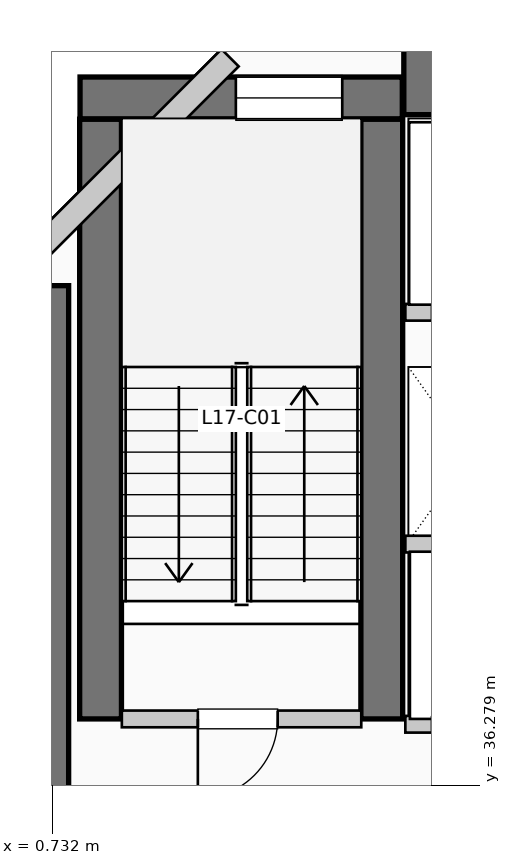
"""IFC4 building model, lengths in metres.
Left out: names, types, materials, properties, quantities, classifications, styles, units other than length and angle.
Written with IfcOpenShell. Run it as: python <this file> out.ifc"""

import sys

from ifc_helpers import new_model, si_unit, direction, frame, frame_2d, origin, place, context, subcontext, project, spatial, rectangle, extrude, element, fill, save


model = new_model("IFC4")
c1 = context("Model", 3, precision=1e-05, world=origin(), true_north=direction((0.0, 1.0)))
c2 = subcontext(c1, "Body", "Model", "MODEL_VIEW")
j1 = project(units=[si_unit("LENGTHUNIT", "METRE"), si_unit("PLANEANGLEUNIT", "RADIAN")], contexts=[c1])
p1 = place(None, origin())
s1 = spatial("IfcSite", under=j1, at=p1, CompositionType="ELEMENT")
p2 = place(p1, origin())
s2 = spatial("IfcBuilding", under=s1, at=p2, CompositionType="ELEMENT")
p3 = place(p2, frame((0.0, 0.0, 73.92)))
s3 = spatial("IfcBuildingStorey", under=s2, at=p3, CompositionType="ELEMENT", Elevation=73.92)
p4 = place(p3, frame((5.36, 45.55, 0.0), z_axis=(0.0, 0.0, 1.0), x_axis=(1.0, 0.0, 0.0)))
e1 = element("IfcWall", 1, at=p4, inside=s3, PredefinedType="SHEAR", context=c2, shape_type="SweptSolid", body=[
    extrude(rectangle(XDim=13.98, YDim=0.9, at=frame_2d((6.99, 0.0))), origin(), (0.0, 0.0, 1.0), 3.96),
])
p5 = place(p3, frame((0.5, 34.95, 0.0), z_axis=(0.0, 0.0, 1.0), x_axis=(0.0, 1.0, 0.0)))
e2 = element("IfcWall", 2, at=p5, inside=s3, PredefinedType="SHEAR", context=c2, shape_type="SweptSolid", body=[
    extrude(rectangle(XDim=7.9, YDim=0.9, at=frame_2d((3.95, 0.0))), origin(), (0.0, 0.0, 1.0), 3.96),
])
for number, where, z_axis, x_axis in (
    (3, (1.37, 37.15, 0.0), (0.0, 0.0, 1.0), (0.0, 1.0, 0.0)),
    (4, (5.07, 37.15, 0.0), (0.0, 0.0, 1.0), (0.0, 1.0, 0.0)),
):
    element("IfcWall", number, at=place(p3, frame(where, z_axis=z_axis, x_axis=x_axis)), inside=s3, PredefinedType="SHEAR", context=c2, shape_type="SweptSolid", body=[
        extrude(rectangle(XDim=7.89, YDim=0.55, at=frame_2d((3.945, 0.0))), origin(), (0.0, 0.0, 1.0), 3.96),
    ])
p6 = place(p3, frame((1.1, 45.32, 0.0), z_axis=(0.0, 0.0, 1.0), x_axis=(1.0, 0.0, 0.0)))
e5 = element("IfcWall", 5, at=p6, inside=s3, PredefinedType="SHEAR", context=c2, shape_type="SweptSolid", body=[
    extrude(rectangle(XDim=4.24, YDim=0.55, at=frame_2d((2.12, 0.0))), origin(), (0.0, 0.0, 1.0), 3.96),
])
p7 = place(p6, frame((2.05, 0.0, 1.05)))
e6 = element("IfcOpeningElement", 6, at=p7, cuts=e5, PredefinedType="OPENING", context=c2, shape_type="SweptSolid", body=[
    extrude(rectangle(XDim=1.4, YDim=1.8, at=frame_2d((0.7, 0.9))), frame((0.0, 0.285, 0.0), z_axis=(0.0, -1.0, 0.0), x_axis=(1.0, 0.0, 0.0)), (0.0, 0.0, 1.0), 0.57),
])
p8 = place(p3, frame((3.074, 45.848, 0.0), z_axis=(0.0, 0.0, 1.0), x_axis=(-0.707106781187, -0.707106781187, 0.0)))
e7 = element("IfcWall", 7, at=p8, inside=s3, PredefinedType="SOLIDWALL", context=c2, shape_type="SweptSolid", body=[
    extrude(rectangle(XDim=4.133, YDim=0.32, at=frame_2d((2.066, 0.0))), origin(), (0.0, 0.0, 1.0), 3.71),
])
p9 = place(p3, frame((1.65, 37.15, 0.0), z_axis=(0.0, 0.0, 1.0), x_axis=(1.0, 0.0, 0.0)))
e8 = element("IfcWall", 8, at=p9, inside=s3, PredefinedType="PARTITIONING", context=c2, shape_type="SweptSolid", body=[
    extrude(rectangle(XDim=3.15, YDim=0.22, at=frame_2d((1.575, 0.0))), origin(), (0.0, 0.0, 1.0), 3.71),
])
p10 = place(p9, frame((2.05, 0.0, 0.0), z_axis=(0.0, 0.0, 1.0), x_axis=(-1.0, 0.0, 0.0)))
e9 = element("IfcOpeningElement", 9, at=p10, cuts=e8, PredefinedType="OPENING", context=c2, shape_type="SweptSolid", body=[
    extrude(rectangle(XDim=1.05, YDim=2.15, at=frame_2d((0.525, 1.075))), frame((0.0, 0.12, 0.0), z_axis=(0.0, -1.0, 0.0), x_axis=(1.0, 0.0, 0.0)), (0.0, 0.0, 1.0), 0.24),
])
p11 = place(p3, frame((5.38, 37.08, 0.0), z_axis=(0.0, 0.0, 1.0), x_axis=(1.0, 0.0, 0.0)))
e10 = element("IfcWall", 10, at=p11, inside=s3, PredefinedType="PARTITIONING", context=c2, shape_type="SweptSolid", body=[
    extrude(rectangle(XDim=3.46, YDim=0.22, at=frame_2d((1.73, 0.0))), origin(), (0.0, 0.0, 1.0), 3.71),
])
p12 = place(p11, frame((1.55, 0.0, 0.0), z_axis=(0.0, 0.0, 1.0), x_axis=(-1.0, 0.0, 0.0)))
e11 = element("IfcOpeningElement", 11, at=p12, cuts=e10, PredefinedType="OPENING", context=c2, shape_type="SweptSolid", body=[
    extrude(rectangle(XDim=1.2, YDim=2.2, at=frame_2d((0.6, 1.1))), frame((0.0, 0.12, 0.0), z_axis=(0.0, -1.0, 0.0), x_axis=(1.0, 0.0, 0.0)), (0.0, 0.0, 1.0), 0.24),
])
p13 = place(p11, frame((3.22, 0.0, 0.0), z_axis=(0.0, 0.0, 1.0), x_axis=(-1.0, 0.0, 0.0)))
e12 = element("IfcOpeningElement", 12, at=p13, cuts=e10, PredefinedType="OPENING", context=c2, shape_type="SweptSolid", body=[
    extrude(rectangle(XDim=1.2, YDim=2.2, at=frame_2d((0.6, 1.1))), frame((0.0, 0.12, 0.0), z_axis=(0.0, -1.0, 0.0), x_axis=(1.0, 0.0, 0.0)), (0.0, 0.0, 1.0), 0.24),
])
p14 = place(p3, frame((5.38, 39.45, 0.0), z_axis=(0.0, 0.0, 1.0), x_axis=(1.0, 0.0, 0.0)))
e13 = element("IfcWall", 13, at=p14, inside=s3, PredefinedType="PARTITIONING", context=c2, shape_type="SweptSolid", body=[
    extrude(rectangle(XDim=3.46, YDim=0.22, at=frame_2d((1.73, 0.0))), origin(), (0.0, 0.0, 1.0), 3.71),
])
p15 = place(p3, frame((5.38, 42.5, 0.0), z_axis=(0.0, 0.0, 1.0), x_axis=(1.0, 0.0, 0.0)))
e14 = element("IfcWall", 14, at=p15, inside=s3, PredefinedType="PARTITIONING", context=c2, shape_type="SweptSolid", body=[
    extrude(rectangle(XDim=3.77, YDim=0.22, at=frame_2d((1.885, 0.0))), origin(), (0.0, 0.0, 1.0), 3.71),
])
p16 = place(p15, frame((1.75, 0.0, 0.0), z_axis=(0.0, 0.0, 1.0), x_axis=(-1.0, 0.0, 0.0)))
e15 = element("IfcOpeningElement", 15, at=p16, cuts=e14, PredefinedType="OPENING", context=c2, shape_type="SweptSolid", body=[
    extrude(rectangle(XDim=1.4, YDim=2.2, at=frame_2d((0.7, 1.1))), frame((0.0, 0.12, 0.0), z_axis=(0.0, -1.0, 0.0), x_axis=(1.0, 0.0, 0.0)), (0.0, 0.0, 1.0), 0.24),
])
p17 = place(p15, frame((3.53, 0.0, 0.0), z_axis=(0.0, 0.0, 1.0), x_axis=(-1.0, 0.0, 0.0)))
e16 = element("IfcOpeningElement", 16, at=p17, cuts=e14, PredefinedType="OPENING", context=c2, shape_type="SweptSolid", body=[
    extrude(rectangle(XDim=1.4, YDim=2.2, at=frame_2d((0.7, 1.1))), frame((0.0, 0.12, 0.0), z_axis=(0.0, -1.0, 0.0), x_axis=(1.0, 0.0, 0.0)), (0.0, 0.0, 1.0), 0.24),
])
p18 = place(p7, origin())
e17 = element("IfcWindow", 17, at=p18, inside=s3, PartitioningType="SINGLE_PANEL", PredefinedType="WINDOW", context=c2, shape_type="SweptSolid", body=[
    extrude(rectangle(XDim=1.4, YDim=1.8, at=frame_2d((0.7, 0.9))), frame((0.0, 0.03, 0.0), z_axis=(0.0, -1.0, 0.0), x_axis=(1.0, 0.0, 0.0)), (0.0, 0.0, 1.0), 0.06),
])
fill(e6, e17)
p19 = place(p10, origin())
e18 = element("IfcDoor", 18, at=p19, inside=s3, OperationType="SINGLE_SWING_LEFT", PredefinedType="DOOR", context=c2, shape_type="SweptSolid", body=[
    extrude(rectangle(XDim=1.05, YDim=2.15, at=frame_2d((0.525, 1.075))), frame((0.0, 0.025, 0.0), z_axis=(0.0, -1.0, 0.0), x_axis=(1.0, 0.0, 0.0)), (0.0, 0.0, 1.0), 0.05),
])
fill(e9, e18)
save(model, sys.argv[1])
